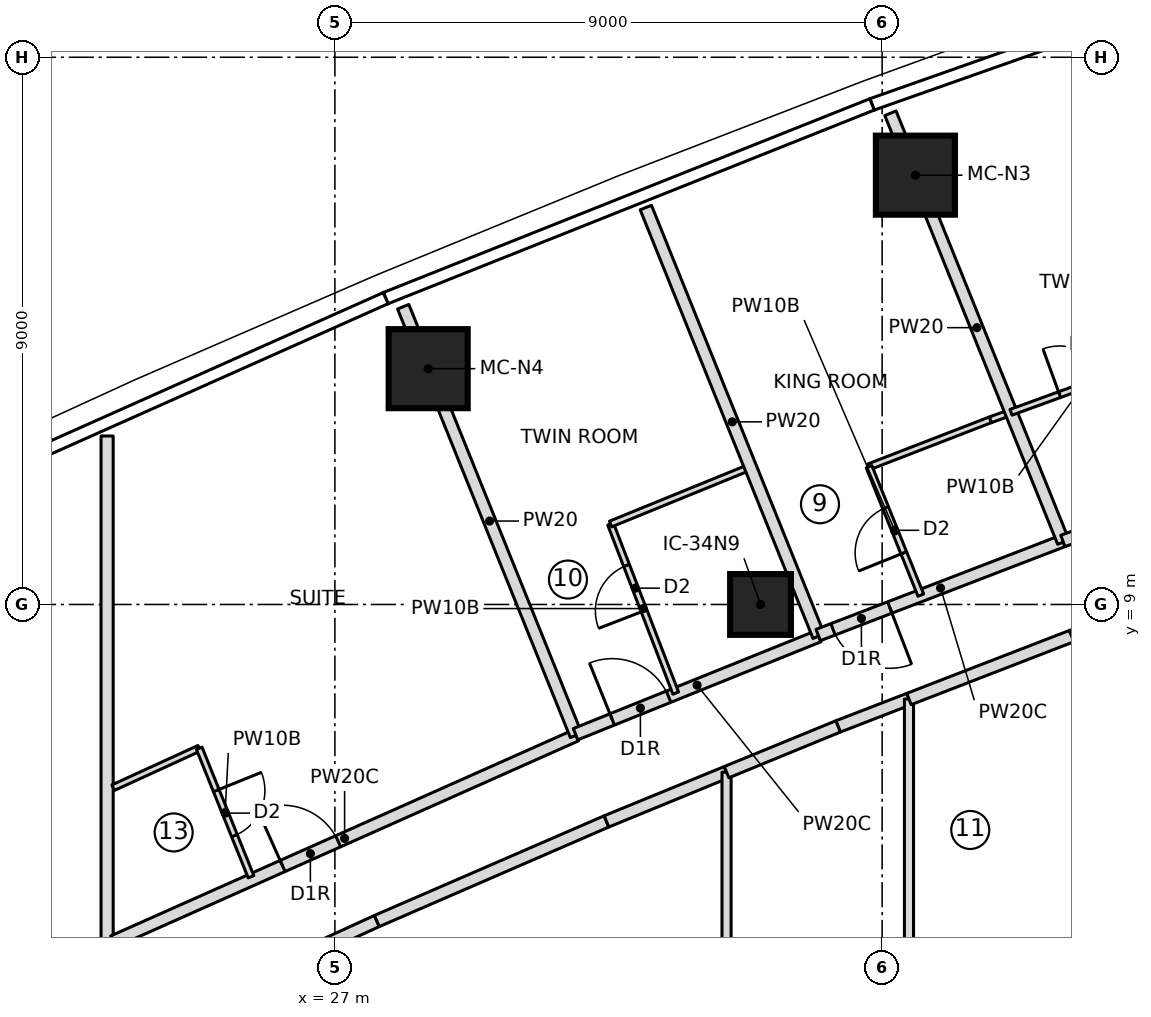
"""IFC4 building model, lengths in metres.
Left out: names, types, materials, properties, quantities, classifications, styles, units other than length and angle.
Written with IfcOpenShell. Run it as: python <this file> out.ifc"""

import sys

from ifc_helpers import new_model, si_unit, direction, frame, frame_2d, origin, origin_2d, place, context, subcontext, project, spatial, rectangle, extrude, element, fill, save


model = new_model("IFC4")
c1 = context("Model", 3, precision=1e-05, world=origin(), true_north=direction((0.0, 1.0)))
c2 = subcontext(c1, "Body", "Model", "MODEL_VIEW")
j1 = project(units=[si_unit("LENGTHUNIT", "METRE"), si_unit("PLANEANGLEUNIT", "RADIAN")], contexts=[c1])
p1 = place(None, origin())
s1 = spatial("IfcSite", under=j1, at=p1, CompositionType="ELEMENT")
p2 = place(p1, origin())
s2 = spatial("IfcBuilding", under=s1, at=p2, CompositionType="ELEMENT")
p3 = place(p2, frame((0.0, 0.0, 203.9)))
s3 = spatial("IfcBuildingStorey", under=s2, at=p3, CompositionType="ELEMENT", Elevation=203.9)
for number, where, z_axis, x_axis in (
    (1, (36.547, 16.061, 0.0), (0.0, 0.0, 1.0), (1.0, 0.0, 0.0)),
    (2, (28.534, 12.878, 0.0), (0.0, 0.0, 1.0), (1.0, 0.0, 0.0)),
):
    element("IfcColumn", number, at=place(p3, frame(where, z_axis=z_axis, x_axis=x_axis)), inside=s3, PredefinedType="COLUMN", context=c2, shape_type="SweptSolid", body=[
        extrude(rectangle(XDim=1.3, YDim=1.3, at=origin_2d()), origin(), (0.0, 0.0, 1.0), 3.55),
    ])
p4 = place(p3, frame((34.0, 9.0, 0.0), z_axis=(0.0, 0.0, 1.0), x_axis=(1.0, 0.0, 0.0)))
e3 = element("IfcColumn", 3, at=p4, inside=s3, PredefinedType="COLUMN", context=c2, shape_type="SweptSolid", body=[
    extrude(rectangle(XDim=1.0, YDim=1.0, at=origin_2d()), origin(), (0.0, 0.0, 1.0), 3.55),
])
p5 = place(p3, frame((23.254, -11.771, 0.0), z_axis=(0.0, 0.0, 1.0), x_axis=(0.0, 1.0, 0.0)))
e4 = element("IfcWall", 4, at=p5, inside=s3, PredefinedType="PARTITIONING", context=c2, shape_type="SweptSolid", body=[
    extrude(rectangle(XDim=23.542, YDim=0.2, at=frame_2d((11.771, 0.0))), origin(), (0.0, 0.0, 1.0), 3.25),
])
p6 = place(p5, frame((14.125, 0.0, 0.0)))
e5 = element("IfcOpeningElement", 5, at=p6, cuts=e4, PredefinedType="OPENING", context=c2, shape_type="SweptSolid", body=[
    extrude(rectangle(XDim=1.0, YDim=2.1, at=frame_2d((0.5, 1.05))), frame((0.0, 0.11, 0.0), z_axis=(0.0, -1.0, 0.0), x_axis=(1.0, 0.0, 0.0)), (0.0, 0.0, 1.0), 0.22),
])
p7 = place(p5, frame((8.417, 0.0, 0.0)))
e6 = element("IfcOpeningElement", 6, at=p7, cuts=e4, PredefinedType="OPENING", context=c2, shape_type="SweptSolid", body=[
    extrude(rectangle(XDim=1.0, YDim=2.1, at=frame_2d((0.5, 1.05))), frame((0.0, 0.11, 0.0), z_axis=(0.0, -1.0, 0.0), x_axis=(1.0, 0.0, 0.0)), (0.0, 0.0, 1.0), 0.22),
])
p8 = place(p3, frame((23.354, 3.458, 0.0), z_axis=(0.0, 0.0, 1.0), x_axis=(0.913485016927, 0.406872368009, 0.0)))
e7 = element("IfcWall", 7, at=p8, inside=s3, PredefinedType="PARTITIONING", context=c2, shape_type="SweptSolid", body=[
    extrude(rectangle(XDim=8.332, YDim=0.2, at=frame_2d((4.166, 0.0))), origin(), (0.0, 0.0, 1.0), 3.25),
])
p9 = place(p8, frame((3.05, 0.0, 0.0)))
e8 = element("IfcOpeningElement", 8, at=p9, cuts=e7, PredefinedType="OPENING", context=c2, shape_type="SweptSolid", body=[
    extrude(rectangle(XDim=1.0, YDim=2.1, at=frame_2d((0.5, 1.05))), frame((0.0, 0.11, 0.0), z_axis=(0.0, -1.0, 0.0), x_axis=(1.0, 0.0, 0.0)), (0.0, 0.0, 1.0), 0.22),
])
p10 = place(p3, frame((23.354, 5.987, 0.0), z_axis=(0.0, 0.0, 1.0), x_axis=(0.909158902999, 0.416449383597, 0.0)))
e9 = element("IfcWall", 9, at=p10, inside=s3, PredefinedType="PARTITIONING", context=c2, shape_type="SweptSolid", body=[
    extrude(rectangle(XDim=1.556, YDim=0.1, at=frame_2d((0.778, 0.0))), origin(), (0.0, 0.0, 1.0), 3.25),
])
p11 = place(p3, frame((24.769, 6.635, 0.0), z_axis=(0.0, 0.0, 1.0), x_axis=(0.373956446544, -0.927446265877, 0.0)))
e10 = element("IfcWall", 10, at=p11, inside=s3, PredefinedType="PARTITIONING", context=c2, shape_type="SweptSolid", body=[
    extrude(rectangle(XDim=2.279, YDim=0.1, at=frame_2d((1.14, 0.0))), origin(), (0.0, 0.0, 1.0), 3.25),
])
p12 = place(p11, frame((0.75, 0.0, 0.0)))
e11 = element("IfcOpeningElement", 11, at=p12, cuts=e10, PredefinedType="OPENING", context=c2, shape_type="SweptSolid", body=[
    extrude(rectangle(XDim=0.8, YDim=2.1, at=frame_2d((0.4, 1.05))), frame((0.0, 0.06, 0.0), z_axis=(0.0, -1.0, 0.0), x_axis=(1.0, 0.0, 0.0)), (0.0, 0.0, 1.0), 0.12),
])
p13 = place(p3, frame((30.965, 6.848, 0.0), z_axis=(0.0, 0.0, 1.0), x_axis=(-0.373876084216, 0.927478664796, 0.0)))
e12 = element("IfcWall", 12, at=p13, inside=s3, PredefinedType="PARTITIONING", context=c2, shape_type="SweptSolid", body=[
    extrude(rectangle(XDim=7.6, YDim=0.2, at=frame_2d((3.8, 0.0))), origin(), (0.0, 0.0, 1.0), 3.25),
])
p14 = place(p3, frame((30.958, 6.866, 0.0), z_axis=(0.0, 0.0, 1.0), x_axis=(0.927398695046, 0.374074404933, 0.0)))
e13 = element("IfcWall", 13, at=p14, inside=s3, PredefinedType="PARTITIONING", context=c2, shape_type="SweptSolid", body=[
    extrude(rectangle(XDim=4.311, YDim=0.2, at=frame_2d((2.155, 0.0))), origin(), (0.0, 0.0, 1.0), 3.25),
])
p15 = place(p14, frame((0.65, 0.0, 0.0)))
e14 = element("IfcOpeningElement", 14, at=p15, cuts=e13, PredefinedType="OPENING", context=c2, shape_type="SweptSolid", body=[
    extrude(rectangle(XDim=1.0, YDim=2.1, at=frame_2d((0.5, 1.05))), frame((0.0, 0.11, 0.0), z_axis=(0.0, -1.0, 0.0), x_axis=(1.0, 0.0, 0.0)), (0.0, 0.0, 1.0), 0.22),
])
p16 = place(p3, frame((32.605, 7.542, 0.0), z_axis=(0.0, 0.0, 1.0), x_axis=(-0.359637744424, 0.933092006603, 0.0)))
e15 = element("IfcWall", 15, at=p16, inside=s3, PredefinedType="PARTITIONING", context=c2, shape_type="SweptSolid", body=[
    extrude(rectangle(XDim=2.98, YDim=0.1, at=frame_2d((1.49, 0.0))), origin(), (0.0, 0.0, 1.0), 3.25),
])
p17 = place(p16, frame((1.45, 0.0, 0.0)))
e16 = element("IfcOpeningElement", 16, at=p17, cuts=e15, PredefinedType="OPENING", context=c2, shape_type="SweptSolid", body=[
    extrude(rectangle(XDim=0.8, YDim=2.1, at=frame_2d((0.4, 1.05))), frame((0.0, 0.06, 0.0), z_axis=(0.0, -1.0, 0.0), x_axis=(1.0, 0.0, 0.0)), (0.0, 0.0, 1.0), 0.12),
])
p18 = place(p3, frame((31.534, 10.323, 0.0), z_axis=(0.0, 0.0, 1.0), x_axis=(0.925906573805, 0.377752586469, 0.0)))
e17 = element("IfcWall", 17, at=p18, inside=s3, PredefinedType="PARTITIONING", context=c2, shape_type="SweptSolid", body=[
    extrude(rectangle(XDim=2.484, YDim=0.1, at=frame_2d((1.242, 0.0))), origin(), (0.0, 0.0, 1.0), 3.25),
])
p19 = place(p3, frame((34.956, 8.479, 0.0), z_axis=(0.0, 0.0, 1.0), x_axis=(-0.373881438439, 0.927476506436, 0.0)))
e18 = element("IfcWall", 18, at=p19, inside=s3, PredefinedType="PARTITIONING", context=c2, shape_type="SweptSolid", body=[
    extrude(rectangle(XDim=7.601, YDim=0.2, at=frame_2d((3.8, 0.0))), origin(), (0.0, 0.0, 1.0), 3.25),
])
p20 = place(p3, frame((38.972, 10.045, 0.0), z_axis=(0.0, 0.0, 1.0), x_axis=(-0.93335728106, -0.358948723208, 0.0)))
e19 = element("IfcWall", 19, at=p20, inside=s3, PredefinedType="PARTITIONING", context=c2, shape_type="SweptSolid", body=[
    extrude(rectangle(XDim=4.312, YDim=0.2, at=frame_2d((2.156, 0.0))), origin(), (0.0, 0.0, 1.0), 3.25),
])
p21 = place(p20, frame((3.05, 0.0, 0.0)))
e20 = element("IfcOpeningElement", 20, at=p21, cuts=e19, PredefinedType="OPENING", context=c2, shape_type="SweptSolid", body=[
    extrude(rectangle(XDim=1.0, YDim=2.1, at=frame_2d((0.5, 1.05))), frame((0.0, 0.11, 0.0), z_axis=(0.0, -1.0, 0.0), x_axis=(1.0, 0.0, 0.0)), (0.0, 0.0, 1.0), 0.22),
])
p22 = place(p3, frame((35.785, 11.266, 0.0), z_axis=(0.0, 0.0, 1.0), x_axis=(0.932673396793, 0.360721963448, 0.0)))
e21 = element("IfcWall", 21, at=p22, inside=s3, PredefinedType="PARTITIONING", context=c2, shape_type="SweptSolid", body=[
    extrude(rectangle(XDim=2.139, YDim=0.1, at=frame_2d((1.07, 0.0))), origin(), (0.0, 0.0, 1.0), 3.25),
])
p23 = place(p3, frame((37.78, 12.037, 0.0), z_axis=(0.0, 0.0, 1.0), x_axis=(0.939595761479, 0.34228614493, 0.0)))
e22 = element("IfcWall", 22, at=p23, inside=s3, PredefinedType="PARTITIONING", context=c2, shape_type="SweptSolid", body=[
    extrude(rectangle(XDim=0.361, YDim=0.1, at=frame_2d((0.18, 0.0))), origin(), (0.0, 0.0, 1.0), 3.25),
])
p24 = place(p3, frame((36.636, 9.154, 0.0), z_axis=(0.0, 0.0, 1.0), x_axis=(-0.373885031976, 0.927475057813, 0.0)))
e23 = element("IfcWall", 23, at=p24, inside=s3, PredefinedType="PARTITIONING", context=c2, shape_type="SweptSolid", body=[
    extrude(rectangle(XDim=2.277, YDim=0.1, at=frame_2d((1.138, 0.0))), origin(), (0.0, 0.0, 1.0), 3.25),
])
p25 = place(p24, frame((0.75, 0.0, 0.0)))
e24 = element("IfcOpeningElement", 24, at=p25, cuts=e23, PredefinedType="OPENING", context=c2, shape_type="SweptSolid", body=[
    extrude(rectangle(XDim=0.8, YDim=2.1, at=frame_2d((0.4, 1.05))), frame((0.0, 0.06, 0.0), z_axis=(0.0, -1.0, 0.0), x_axis=(1.0, 0.0, 0.0)), (0.0, 0.0, 1.0), 0.12),
])
p26 = place(p3, frame((38.98, 10.026, 0.0), z_axis=(0.0, 0.0, 1.0), x_axis=(-0.373863662938, 0.927483671843, 0.0)))
e25 = element("IfcWall", 25, at=p26, inside=s3, PredefinedType="PARTITIONING", context=c2, shape_type="SweptSolid", body=[
    extrude(rectangle(XDim=7.604, YDim=0.2, at=frame_2d((3.802, 0.0))), origin(), (0.0, 0.0, 1.0), 3.25),
])
p27 = place(p3, frame((43.026, 11.507, 0.0), z_axis=(0.0, 0.0, 1.0), x_axis=(-0.940653905433, -0.339367397069, 0.0)))
e26 = element("IfcWall", 26, at=p27, inside=s3, PredefinedType="PARTITIONING", context=c2, shape_type="SweptSolid", body=[
    extrude(rectangle(XDim=4.309, YDim=0.2, at=frame_2d((2.155, 0.0))), origin(), (0.0, 0.0, 1.0), 3.25),
])
p28 = place(p27, frame((0.4, 0.0, 0.0)))
e27 = element("IfcOpeningElement", 27, at=p28, cuts=e26, PredefinedType="OPENING", context=c2, shape_type="SweptSolid", body=[
    extrude(rectangle(XDim=1.0, YDim=2.1, at=frame_2d((0.5, 1.05))), frame((0.0, 0.11, 0.0), z_axis=(0.0, -1.0, 0.0), x_axis=(1.0, 0.0, 0.0)), (0.0, 0.0, 1.0), 0.22),
])
p29 = place(p3, frame((38.119, 12.161, 0.0), z_axis=(0.0, 0.0, 1.0), x_axis=(0.939744972593, 0.341876273652, 0.0)))
e28 = element("IfcWall", 28, at=p29, inside=s3, PredefinedType="PARTITIONING", context=c2, shape_type="SweptSolid", body=[
    extrude(rectangle(XDim=2.501, YDim=0.1, at=frame_2d((1.251, 0.0))), origin(), (0.0, 0.0, 1.0), 3.25),
])
p30 = place(p29, frame((0.85, 0.0, 0.0)))
e29 = element("IfcOpeningElement", 29, at=p30, cuts=e28, PredefinedType="OPENING", context=c2, shape_type="SweptSolid", body=[
    extrude(rectangle(XDim=0.8, YDim=2.1, at=frame_2d((0.4, 1.05))), frame((0.0, 0.06, 0.0), z_axis=(0.0, -1.0, 0.0), x_axis=(1.0, 0.0, 0.0)), (0.0, 0.0, 1.0), 0.12),
])
p31 = place(p3, frame((23.947, 2.079, 0.0), z_axis=(0.0, 0.0, 1.0), x_axis=(0.909180834404, 0.416401501382, 0.0)))
e30 = element("IfcWall", 30, at=p31, inside=s3, PredefinedType="PARTITIONING", context=c2, shape_type="SweptSolid", body=[
    extrude(rectangle(XDim=4.117, YDim=0.2, at=frame_2d((2.059, 0.0))), origin(), (0.0, 0.0, 1.0), 3.25),
])
p32 = place(p3, frame((27.69, 3.793, 0.0), z_axis=(0.0, 0.0, 1.0), x_axis=(0.917375244839, 0.398023441717, 0.0)))
e31 = element("IfcWall", 31, at=p32, inside=s3, PredefinedType="PARTITIONING", context=c2, shape_type="SweptSolid", body=[
    extrude(rectangle(XDim=4.117, YDim=0.2, at=frame_2d((2.059, 0.0))), origin(), (0.0, 0.0, 1.0), 3.25),
])
p33 = place(p3, frame((31.467, 5.432, 0.0), z_axis=(0.0, 0.0, 1.0), x_axis=(0.925231428595, 0.379403220256, 0.0)))
e32 = element("IfcWall", 32, at=p33, inside=s3, PredefinedType="PARTITIONING", context=c2, shape_type="SweptSolid", body=[
    extrude(rectangle(XDim=2.135, YDim=0.2, at=frame_2d((1.067, 0.0))), origin(), (0.0, 0.0, 1.0), 3.25),
])
p34 = place(p3, frame((33.441, -6.242, 0.0), z_axis=(0.0, 0.0, 1.0), x_axis=(0.0, 1.0, 0.0)))
e33 = element("IfcWall", 33, at=p34, inside=s3, PredefinedType="PARTITIONING", context=c2, shape_type="SweptSolid", body=[
    extrude(rectangle(XDim=12.484, YDim=0.15, at=frame_2d((6.242, 0.0))), origin(), (0.0, 0.0, 1.0), 3.25),
])
p35 = place(p3, frame((35.276, 6.994, 0.0), z_axis=(0.0, 0.0, 1.0), x_axis=(0.932724985261, 0.360588549276, 0.0)))
e34 = element("IfcWall", 34, at=p35, inside=s3, PredefinedType="PARTITIONING", context=c2, shape_type="SweptSolid", body=[
    extrude(rectangle(XDim=1.25, YDim=0.2, at=frame_2d((0.625, 0.0))), origin(), (0.0, 0.0, 1.0), 3.25),
])
p36 = place(p3, frame((33.441, 6.242, 0.0), z_axis=(0.0, 0.0, 1.0), x_axis=(0.925179705777, 0.379529329589, 0.0)))
e35 = element("IfcWall", 35, at=p36, inside=s3, PredefinedType="PARTITIONING", context=c2, shape_type="SweptSolid", body=[
    extrude(rectangle(XDim=1.983, YDim=0.2, at=frame_2d((0.991, 0.0))), origin(), (0.0, 0.0, 1.0), 3.25),
])
p37 = place(p3, frame((36.441, -7.445, 0.0), z_axis=(0.0, 0.0, 1.0), x_axis=(0.0, 1.0, 0.0)))
e36 = element("IfcWall", 36, at=p37, inside=s3, PredefinedType="PARTITIONING", context=c2, shape_type="SweptSolid", body=[
    extrude(rectangle(XDim=14.89, YDim=0.15, at=frame_2d((7.445, 0.0))), origin(), (0.0, 0.0, 1.0), 3.25),
])
p38 = place(p3, frame((39.115, 8.479, 0.0), z_axis=(0.0, 0.0, 1.0), x_axis=(0.939746227223, 0.341872824923, 0.0)))
e37 = element("IfcWall", 37, at=p38, inside=s3, PredefinedType="PARTITIONING", context=c2, shape_type="SweptSolid", body=[
    extrude(rectangle(XDim=2.266, YDim=0.2, at=frame_2d((1.133, 0.0))), origin(), (0.0, 0.0, 1.0), 3.25),
])
p39 = place(p3, frame((36.441, 7.445, 0.0), z_axis=(0.0, 0.0, 1.0), x_axis=(0.932650373077, 0.36078148733, 0.0)))
e38 = element("IfcWall", 38, at=p39, inside=s3, PredefinedType="PARTITIONING", context=c2, shape_type="SweptSolid", body=[
    extrude(rectangle(XDim=2.867, YDim=0.2, at=frame_2d((1.434, 0.0))), origin(), (0.0, 0.0, 1.0), 3.25),
])
p40 = place(p12, origin())
e39 = element("IfcDoor", 39, at=p40, inside=s3, OperationType="SINGLE_SWING_LEFT", PredefinedType="DOOR", context=c2, shape_type="SweptSolid", body=[
    extrude(rectangle(XDim=0.8, YDim=2.1, at=frame_2d((0.4, 1.05))), frame((0.0, 0.025, 0.0), z_axis=(0.0, -1.0, 0.0), x_axis=(1.0, 0.0, 0.0)), (0.0, 0.0, 1.0), 0.05),
])
fill(e11, e39)
p41 = place(p9, origin())
e40 = element("IfcDoor", 40, at=p41, inside=s3, OperationType="SINGLE_SWING_RIGHT", PredefinedType="DOOR", context=c2, shape_type="SweptSolid", body=[
    extrude(rectangle(XDim=1.0, YDim=2.1, at=frame_2d((0.5, 1.05))), frame((0.0, 0.025, 0.0), z_axis=(0.0, -1.0, 0.0), x_axis=(1.0, 0.0, 0.0)), (0.0, 0.0, 1.0), 0.05),
])
fill(e8, e40)
p42 = place(p17, origin())
e41 = element("IfcDoor", 41, at=p42, inside=s3, OperationType="SINGLE_SWING_LEFT", PredefinedType="DOOR", context=c2, shape_type="SweptSolid", body=[
    extrude(rectangle(XDim=0.8, YDim=2.1, at=frame_2d((0.4, 1.05))), frame((0.0, 0.025, 0.0), z_axis=(0.0, -1.0, 0.0), x_axis=(1.0, 0.0, 0.0)), (0.0, 0.0, 1.0), 0.05),
])
fill(e16, e41)
p43 = place(p15, origin())
e42 = element("IfcDoor", 42, at=p43, inside=s3, OperationType="SINGLE_SWING_RIGHT", PredefinedType="DOOR", context=c2, shape_type="SweptSolid", body=[
    extrude(rectangle(XDim=1.0, YDim=2.1, at=frame_2d((0.5, 1.05))), frame((0.0, 0.025, 0.0), z_axis=(0.0, -1.0, 0.0), x_axis=(1.0, 0.0, 0.0)), (0.0, 0.0, 1.0), 0.05),
])
fill(e14, e42)
p44 = place(p25, origin())
e43 = element("IfcDoor", 43, at=p44, inside=s3, OperationType="SINGLE_SWING_LEFT", PredefinedType="DOOR", context=c2, shape_type="SweptSolid", body=[
    extrude(rectangle(XDim=0.8, YDim=2.1, at=frame_2d((0.4, 1.05))), frame((0.0, 0.025, 0.0), z_axis=(0.0, -1.0, 0.0), x_axis=(1.0, 0.0, 0.0)), (0.0, 0.0, 1.0), 0.05),
])
fill(e24, e43)
p45 = place(p21, origin())
e44 = element("IfcDoor", 44, at=p45, inside=s3, OperationType="SINGLE_SWING_RIGHT", PredefinedType="DOOR", context=c2, shape_type="SweptSolid", body=[
    extrude(rectangle(XDim=1.0, YDim=2.1, at=frame_2d((0.5, 1.05))), frame((0.0, 0.025, 0.0), z_axis=(0.0, -1.0, 0.0), x_axis=(1.0, 0.0, 0.0)), (0.0, 0.0, 1.0), 0.05),
])
fill(e20, e44)
p46 = place(p30, origin())
e45 = element("IfcDoor", 45, at=p46, inside=s3, OperationType="SINGLE_SWING_LEFT", PredefinedType="DOOR", context=c2, shape_type="SweptSolid", body=[
    extrude(rectangle(XDim=0.8, YDim=2.1, at=frame_2d((0.4, 1.05))), frame((0.0, 0.025, 0.0), z_axis=(0.0, -1.0, 0.0), x_axis=(1.0, 0.0, 0.0)), (0.0, 0.0, 1.0), 0.05),
])
fill(e29, e45)
save(model, sys.argv[1])
